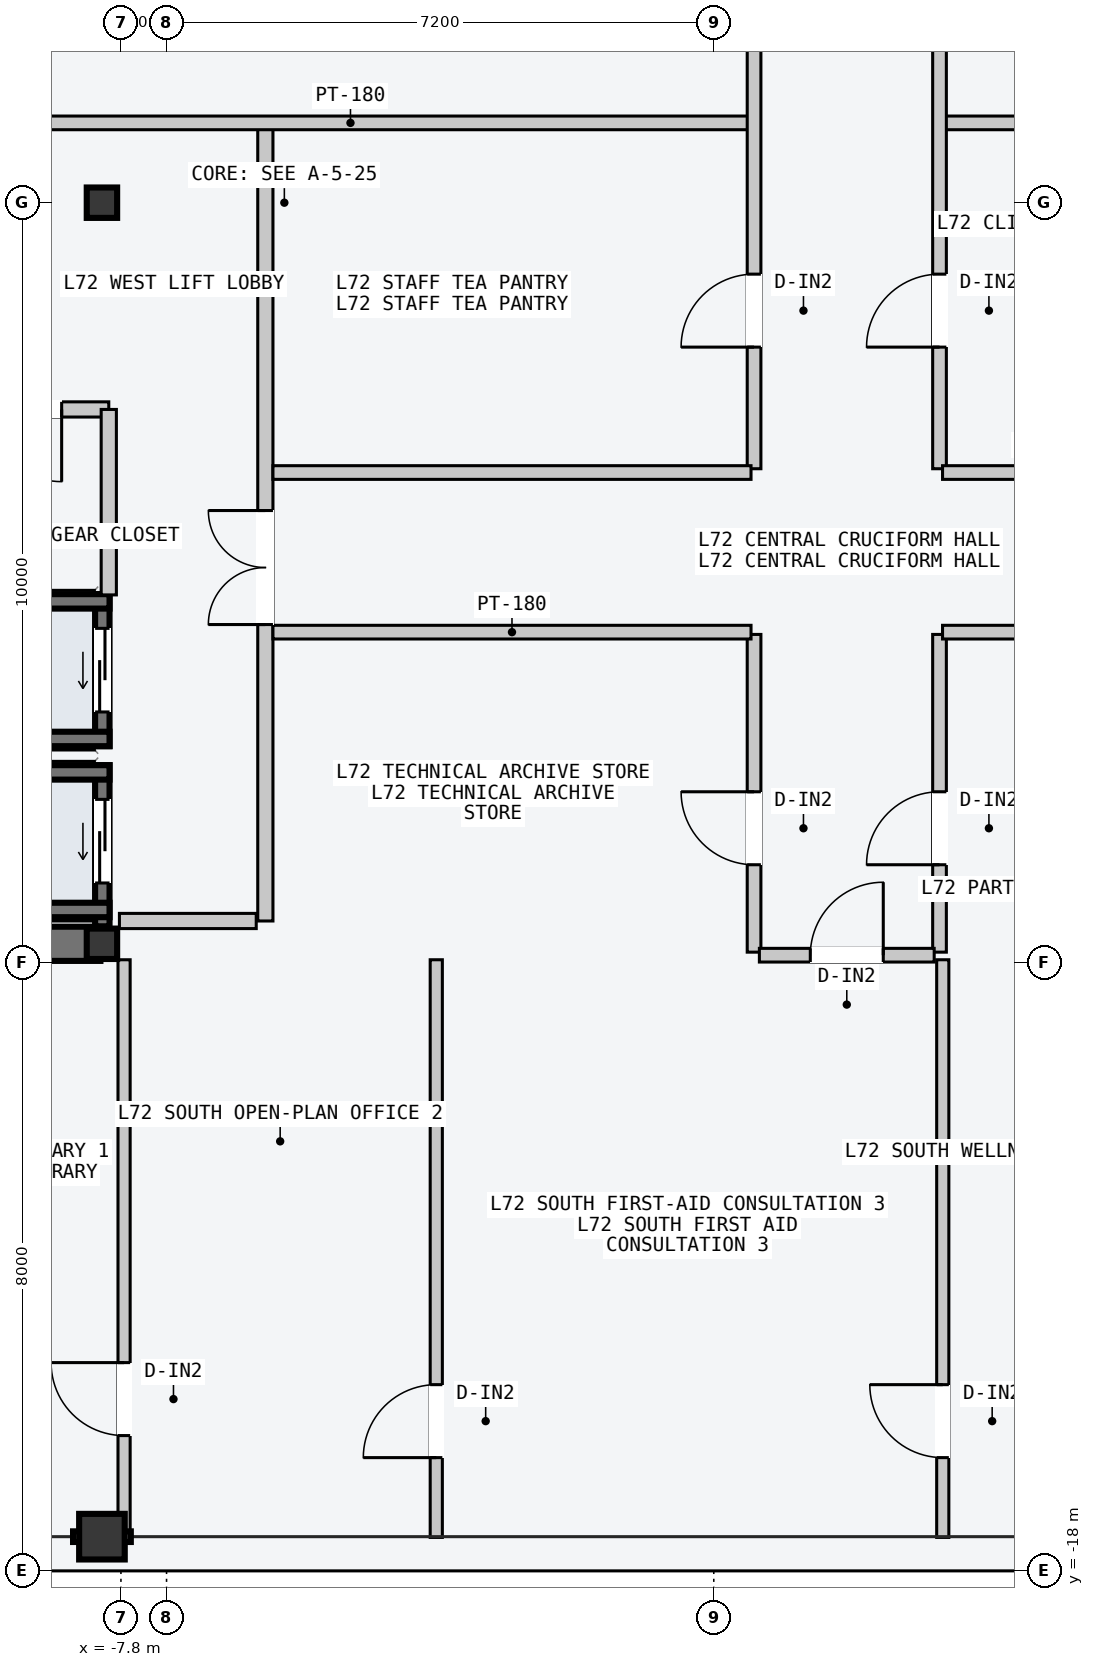
"""IFC4 building model, lengths in metres.
Left out: names, types, materials, properties, quantities, classifications, styles, units other than length and angle.
Written with IfcOpenShell. Run it as: python <this file> out.ifc"""

import sys

from ifc_helpers import new_model, si_unit, direction, frame, frame_2d, origin, origin_2d, place, context, subcontext, project, spatial, rectangle, hollow_rectangle, i_section, extrude, element, fill, save


model = new_model("IFC4")
c1 = context("Model", 3, precision=1e-05, world=origin(), true_north=direction((0.0, 1.0)))
c2 = subcontext(c1, "Body", "Model", "MODEL_VIEW")
j1 = project(units=[si_unit("LENGTHUNIT", "METRE"), si_unit("PLANEANGLEUNIT", "RADIAN")], contexts=[c1])
p1 = place(None, origin())
s1 = spatial("IfcSite", under=j1, at=p1, CompositionType="ELEMENT")
p2 = place(p1, origin())
s2 = spatial("IfcBuilding", under=s1, at=p2, CompositionType="ELEMENT")
p3 = place(p2, frame((0.0, 0.0, 272.4)))
s3 = spatial("IfcBuildingStorey", under=s2, at=p3, CompositionType="ELEMENT", Elevation=272.4)
p4 = place(p3, frame((-14.53, -9.75, -0.2), z_axis=(0.0, 0.0, 1.0), x_axis=(1.0, 0.0, 0.0)))
e1 = element("IfcWall", 1, at=p4, inside=s3, PredefinedType="SHEAR", context=c2, shape_type="SweptSolid", body=[
    extrude(rectangle(XDim=6.46, YDim=0.45, at=frame_2d((3.23, 0.0))), origin(), (0.0, 0.0, 1.0), 3.6),
])
for number, where, z_axis, x_axis in (
    (2, (-8.05, -9.75, 0.0), (0.0, 0.0, 1.0), (1.0, 0.0, 0.0)),
    (3, (-8.05, 0.0, 0.0), (0.0, 0.0, 1.0), (1.0, 0.0, 0.0)),
):
    element("IfcColumn", number, at=place(p3, frame(where, z_axis=z_axis, x_axis=x_axis)), inside=s3, PredefinedType="COLUMN", context=c2, shape_type="SweptSolid", body=[
        extrude(i_section(OverallWidth=0.4, OverallDepth=0.4, WebThickness=0.013, FlangeThickness=0.021, at=origin_2d()), origin(), (0.0, 0.0, 1.0), 3.6),
    ])
p5 = place(p3, frame((-8.05, -17.55, 0.0), z_axis=(0.0, 0.0, 1.0), x_axis=(1.0, 0.0, 0.0)))
e4 = element("IfcColumn", 4, at=p5, inside=s3, PredefinedType="COLUMN", context=c2, shape_type="SweptSolid", body=[
    extrude(hollow_rectangle(XDim=0.6, YDim=0.6, WallThickness=0.025, at=origin_2d()), origin(), (0.0, 0.0, 1.0), 3.6),
])
p6 = place(p3, frame((-8.045, -9.52, -0.2), z_axis=(0.0, 0.0, 1.0), x_axis=(0.0, 1.0, 0.0)))
e5 = element("IfcWall", 5, at=p6, inside=s3, PredefinedType="SOLIDWALL", context=c2, shape_type="SweptSolid", body=[
    extrude(rectangle(XDim=2.12, YDim=0.19, at=frame_2d((1.06, 0.0))), origin(), (0.0, 0.0, 1.0), 3.6),
])
p7 = place(p6, frame((0.57, 0.0, 0.2)))
e6 = element("IfcOpeningElement", 6, at=p7, cuts=e5, PredefinedType="OPENING", context=c2, shape_type="SweptSolid", body=[
    extrude(rectangle(XDim=1.1, YDim=2.2, at=frame_2d((0.55, 1.1))), frame((0.0, 0.105, 0.0), z_axis=(0.0, -1.0, 0.0), x_axis=(1.0, 0.0, 0.0)), (0.0, 0.0, 1.0), 0.21),
])
for number, where, z_axis, x_axis in (
    (7, (-10.15, -7.495, -0.2), (0.0, 0.0, 1.0), (1.0, 0.0, 0.0)),
    (8, (-10.15, -9.305, -0.2), (0.0, 0.0, 1.0), (1.0, 0.0, 0.0)),
):
    element("IfcWall", number, at=place(p3, frame(where, z_axis=z_axis, x_axis=x_axis)), inside=s3, PredefinedType="SOLIDWALL", context=c2, shape_type="SweptSolid", body=[
        extrude(rectangle(XDim=2.2, YDim=0.19, at=frame_2d((1.1, 0.0))), origin(), (0.0, 0.0, 1.0), 3.6),
    ])
p8 = place(p3, frame((-8.045, -7.15, -0.2), z_axis=(0.0, 0.0, 1.0), x_axis=(0.0, 1.0, 0.0)))
e9 = element("IfcWall", 9, at=p8, inside=s3, PredefinedType="SOLIDWALL", context=c2, shape_type="SweptSolid", body=[
    extrude(rectangle(XDim=2.0, YDim=0.19, at=frame_2d((1.0, 0.0))), origin(), (0.0, 0.0, 1.0), 3.6),
])
p9 = place(p8, frame((0.45, 0.0, 0.2)))
e10 = element("IfcOpeningElement", 10, at=p9, cuts=e9, PredefinedType="OPENING", context=c2, shape_type="SweptSolid", body=[
    extrude(rectangle(XDim=1.1, YDim=2.2, at=frame_2d((0.55, 1.1))), frame((0.0, 0.105, 0.0), z_axis=(0.0, -1.0, 0.0), x_axis=(1.0, 0.0, 0.0)), (0.0, 0.0, 1.0), 0.21),
])
for number, where, z_axis, x_axis in (
    (11, (-10.15, -5.245, -0.2), (0.0, 0.0, 1.0), (1.0, 0.0, 0.0)),
    (12, (-10.15, -7.055, -0.2), (0.0, 0.0, 1.0), (1.0, 0.0, 0.0)),
):
    element("IfcWall", number, at=place(p3, frame(where, z_axis=z_axis, x_axis=x_axis)), inside=s3, PredefinedType="SOLIDWALL", context=c2, shape_type="SweptSolid", body=[
        extrude(rectangle(XDim=2.2, YDim=0.19, at=frame_2d((1.1, 0.0))), origin(), (0.0, 0.0, 1.0), 3.6),
    ])
p10 = place(p3, frame((-5.9, -9.45, 0.0), z_axis=(0.0, 0.0, 1.0), x_axis=(0.0, 1.0, 0.0)))
e13 = element("IfcWall", 13, at=p10, inside=s3, PredefinedType="PARTITIONING", context=c2, shape_type="SweptSolid", body=[
    extrude(rectangle(XDim=10.5, YDim=0.2, at=frame_2d((5.25, 0.0))), origin(), (0.0, 0.0, 1.0), 3.4),
])
p11 = place(p10, frame((3.9, 0.0, 0.0)))
e14 = element("IfcOpeningElement", 14, at=p11, cuts=e13, PredefinedType="OPENING", context=c2, shape_type="SweptSolid", body=[
    extrude(rectangle(XDim=1.5, YDim=2.2, at=frame_2d((0.75, 1.1))), frame((0.0, 0.11, 0.0), z_axis=(0.0, -1.0, 0.0), x_axis=(1.0, 0.0, 0.0)), (0.0, 0.0, 1.0), 0.22),
])
p12 = place(p3, frame((-6.02, -9.45, 0.0), z_axis=(0.0, 0.0, 1.0), x_axis=(-1.0, 0.0, 0.0)))
e15 = element("IfcWall", 15, at=p12, inside=s3, PredefinedType="PARTITIONING", context=c2, shape_type="SweptSolid", body=[
    extrude(rectangle(XDim=1.8, YDim=0.2, at=frame_2d((0.9, 0.0))), origin(), (0.0, 0.0, 1.0), 3.4),
])
p13 = place(p3, frame((-7.96, -2.72, 0.0), z_axis=(0.0, 0.0, 1.0), x_axis=(-1.0, 0.0, 0.0)))
e16 = element("IfcWall", 16, at=p13, inside=s3, PredefinedType="PARTITIONING", context=c2, shape_type="SweptSolid", body=[
    extrude(rectangle(XDim=2.2, YDim=0.2, at=frame_2d((1.1, 0.0))), origin(), (0.0, 0.0, 1.0), 3.4),
])
p14 = place(p13, frame((0.62, 0.0, 0.0)))
e17 = element("IfcOpeningElement", 17, at=p14, cuts=e16, PredefinedType="OPENING", context=c2, shape_type="SweptSolid", body=[
    extrude(rectangle(XDim=0.95, YDim=2.1, at=frame_2d((0.475, 1.05))), frame((0.0, 0.11, 0.0), z_axis=(0.0, -1.0, 0.0), x_axis=(1.0, 0.0, 0.0)), (0.0, 0.0, 1.0), 0.22),
])
p15 = place(p3, frame((-7.96, -5.16, 0.0), z_axis=(0.0, 0.0, 1.0), x_axis=(0.0, 1.0, 0.0)))
e18 = element("IfcWall", 18, at=p15, inside=s3, PredefinedType="PARTITIONING", context=c2, shape_type="SweptSolid", body=[
    extrude(rectangle(XDim=2.44, YDim=0.2, at=frame_2d((1.22, 0.0))), origin(), (0.0, 0.0, 1.0), 3.4),
])
p16 = place(p3, frame((-10.05, 1.05, 0.0), z_axis=(0.0, 0.0, 1.0), x_axis=(1.0, 0.0, 0.0)))
e19 = element("IfcWall", 19, at=p16, inside=s3, PredefinedType="PARTITIONING", context=c2, shape_type="SweptSolid", body=[
    extrude(rectangle(XDim=10.54, YDim=0.18, at=frame_2d((5.27, 0.0))), origin(), (0.0, 0.0, 1.0), 3.4),
])
p17 = place(p3, frame((0.53, -3.5, 0.0), z_axis=(0.0, 0.0, 1.0), x_axis=(0.0, 1.0, 0.0)))
e20 = element("IfcWall", 20, at=p17, inside=s3, PredefinedType="PARTITIONING", context=c2, shape_type="SweptSolid", body=[
    extrude(rectangle(XDim=13.67, YDim=0.18, at=frame_2d((6.835, 0.0))), origin(), (0.0, 0.0, 1.0), 3.4),
])
p18 = place(p17, frame((6.1, 0.0, 0.0)))
e21 = element("IfcOpeningElement", 21, at=p18, cuts=e20, PredefinedType="OPENING", context=c2, shape_type="SweptSolid", body=[
    extrude(rectangle(XDim=1.24, YDim=2.24, at=frame_2d((0.62, 1.12))), frame((0.0, 0.1, 0.0), z_axis=(0.0, -1.0, 0.0), x_axis=(1.0, 0.0, 0.0)), (0.0, 0.0, 1.0), 0.2),
])
p19 = place(p17, frame((1.6, 0.0, 0.0)))
e22 = element("IfcOpeningElement", 22, at=p19, cuts=e20, PredefinedType="OPENING", context=c2, shape_type="SweptSolid", body=[
    extrude(rectangle(XDim=0.96, YDim=2.18, at=frame_2d((0.48, 1.09))), frame((0.0, 0.1, 0.0), z_axis=(0.0, -1.0, 0.0), x_axis=(1.0, 0.0, 0.0)), (0.0, 0.0, 1.0), 0.2),
])
p20 = place(p3, frame((-5.8, -3.55, 0.0), z_axis=(0.0, 0.0, 1.0), x_axis=(1.0, 0.0, 0.0)))
e23 = element("IfcWall", 23, at=p20, inside=s3, PredefinedType="PARTITIONING", context=c2, shape_type="SweptSolid", body=[
    extrude(rectangle(XDim=6.29, YDim=0.18, at=frame_2d((3.145, 0.0))), origin(), (0.0, 0.0, 1.0), 3.4),
])
p21 = place(p3, frame((3.01, 1.05, 0.0), z_axis=(0.0, 0.0, 1.0), x_axis=(1.0, 0.0, 0.0)))
e24 = element("IfcWall", 24, at=p21, inside=s3, PredefinedType="PARTITIONING", context=c2, shape_type="SweptSolid", body=[
    extrude(rectangle(XDim=7.05, YDim=0.18, at=frame_2d((3.525, 0.0))), origin(), (0.0, 0.0, 1.0), 3.4),
])
p22 = place(p3, frame((2.97, -3.5, 0.0), z_axis=(0.0, 0.0, 1.0), x_axis=(0.0, 1.0, 0.0)))
e25 = element("IfcWall", 25, at=p22, inside=s3, PredefinedType="PARTITIONING", context=c2, shape_type="SweptSolid", body=[
    extrude(rectangle(XDim=13.67, YDim=0.18, at=frame_2d((6.835, 0.0))), origin(), (0.0, 0.0, 1.0), 3.4),
])
p23 = place(p22, frame((6.1, 0.0, 0.0)))
e26 = element("IfcOpeningElement", 26, at=p23, cuts=e25, PredefinedType="OPENING", context=c2, shape_type="SweptSolid", body=[
    extrude(rectangle(XDim=1.24, YDim=2.24, at=frame_2d((0.62, 1.12))), frame((0.0, 0.1, 0.0), z_axis=(0.0, -1.0, 0.0), x_axis=(1.0, 0.0, 0.0)), (0.0, 0.0, 1.0), 0.2),
])
p24 = place(p22, frame((1.6, 0.0, 0.0)))
e27 = element("IfcOpeningElement", 27, at=p24, cuts=e25, PredefinedType="OPENING", context=c2, shape_type="SweptSolid", body=[
    extrude(rectangle(XDim=0.96, YDim=2.18, at=frame_2d((0.48, 1.09))), frame((0.0, 0.1, 0.0), z_axis=(0.0, -1.0, 0.0), x_axis=(1.0, 0.0, 0.0)), (0.0, 0.0, 1.0), 0.2),
])
p25 = place(p3, frame((3.01, -3.55, 0.0), z_axis=(0.0, 0.0, 1.0), x_axis=(1.0, 0.0, 0.0)))
e28 = element("IfcWall", 28, at=p25, inside=s3, PredefinedType="PARTITIONING", context=c2, shape_type="SweptSolid", body=[
    extrude(rectangle(XDim=2.79, YDim=0.18, at=frame_2d((1.395, 0.0))), origin(), (0.0, 0.0, 1.0), 3.4),
])
p26 = place(p3, frame((0.53, -9.86, 0.0), z_axis=(0.0, 0.0, 1.0), x_axis=(0.0, 1.0, 0.0)))
e29 = element("IfcWall", 29, at=p26, inside=s3, PredefinedType="PARTITIONING", context=c2, shape_type="SweptSolid", body=[
    extrude(rectangle(XDim=4.18, YDim=0.18, at=frame_2d((2.09, 0.0))), origin(), (0.0, 0.0, 1.0), 3.4),
])
p27 = place(p26, frame((1.15, 0.0, 0.0)))
e30 = element("IfcOpeningElement", 30, at=p27, cuts=e29, PredefinedType="OPENING", context=c2, shape_type="SweptSolid", body=[
    extrude(rectangle(XDim=0.96, YDim=2.18, at=frame_2d((0.48, 1.09))), frame((0.0, 0.1, 0.0), z_axis=(0.0, -1.0, 0.0), x_axis=(1.0, 0.0, 0.0)), (0.0, 0.0, 1.0), 0.2),
])
p28 = place(p3, frame((2.97, -9.86, 0.0), z_axis=(0.0, 0.0, 1.0), x_axis=(0.0, 1.0, 0.0)))
e31 = element("IfcWall", 31, at=p28, inside=s3, PredefinedType="PARTITIONING", context=c2, shape_type="SweptSolid", body=[
    extrude(rectangle(XDim=4.18, YDim=0.18, at=frame_2d((2.09, 0.0))), origin(), (0.0, 0.0, 1.0), 3.4),
])
p29 = place(p28, frame((1.15, 0.0, 0.0)))
e32 = element("IfcOpeningElement", 32, at=p29, cuts=e31, PredefinedType="OPENING", context=c2, shape_type="SweptSolid", body=[
    extrude(rectangle(XDim=0.96, YDim=2.18, at=frame_2d((0.48, 1.09))), frame((0.0, 0.1, 0.0), z_axis=(0.0, -1.0, 0.0), x_axis=(1.0, 0.0, 0.0)), (0.0, 0.0, 1.0), 0.2),
])
p30 = place(p3, frame((-5.8, -5.65, 0.0), z_axis=(0.0, 0.0, 1.0), x_axis=(1.0, 0.0, 0.0)))
e33 = element("IfcWall", 33, at=p30, inside=s3, PredefinedType="PARTITIONING", context=c2, shape_type="SweptSolid", body=[
    extrude(rectangle(XDim=6.29, YDim=0.18, at=frame_2d((3.145, 0.0))), origin(), (0.0, 0.0, 1.0), 3.4),
])
p31 = place(p3, frame((3.01, -5.65, 0.0), z_axis=(0.0, 0.0, 1.0), x_axis=(1.0, 0.0, 0.0)))
e34 = element("IfcWall", 34, at=p31, inside=s3, PredefinedType="PARTITIONING", context=c2, shape_type="SweptSolid", body=[
    extrude(rectangle(XDim=2.79, YDim=0.18, at=frame_2d((1.395, 0.0))), origin(), (0.0, 0.0, 1.0), 3.4),
])
p32 = place(p3, frame((-7.759, -17.56, 0.0), z_axis=(0.0, 0.0, 1.0), x_axis=(0.0, 1.0, 0.0)))
e35 = element("IfcWall", 35, at=p32, inside=s3, PredefinedType="PARTITIONING", context=c2, shape_type="SweptSolid", body=[
    extrude(rectangle(XDim=7.6, YDim=0.16, at=frame_2d((3.8, 0.0))), origin(), (0.0, 0.0, 1.0), 3.4),
])
p33 = place(p32, frame((1.34, 0.0, 0.0)))
e36 = element("IfcOpeningElement", 36, at=p33, cuts=e35, PredefinedType="OPENING", context=c2, shape_type="SweptSolid", body=[
    extrude(rectangle(XDim=0.96, YDim=2.18, at=frame_2d((0.48, 1.09))), frame((0.0, 0.09, 0.0), z_axis=(0.0, -1.0, 0.0), x_axis=(1.0, 0.0, 0.0)), (0.0, 0.0, 1.0), 0.18),
])
p34 = place(p3, frame((-3.651, -17.56, 0.0), z_axis=(0.0, 0.0, 1.0), x_axis=(0.0, 1.0, 0.0)))
e37 = element("IfcWall", 37, at=p34, inside=s3, PredefinedType="PARTITIONING", context=c2, shape_type="SweptSolid", body=[
    extrude(rectangle(XDim=7.6, YDim=0.16, at=frame_2d((3.8, 0.0))), origin(), (0.0, 0.0, 1.0), 3.4),
])
p35 = place(p34, frame((1.05, 0.0, 0.0)))
e38 = element("IfcOpeningElement", 38, at=p35, cuts=e37, PredefinedType="OPENING", context=c2, shape_type="SweptSolid", body=[
    extrude(rectangle(XDim=0.96, YDim=2.18, at=frame_2d((0.48, 1.09))), frame((0.0, 0.09, 0.0), z_axis=(0.0, -1.0, 0.0), x_axis=(1.0, 0.0, 0.0)), (0.0, 0.0, 1.0), 0.18),
])
p36 = place(p3, frame((3.013, -17.56, 0.0), z_axis=(0.0, 0.0, 1.0), x_axis=(0.0, 1.0, 0.0)))
e39 = element("IfcWall", 39, at=p36, inside=s3, PredefinedType="PARTITIONING", context=c2, shape_type="SweptSolid", body=[
    extrude(rectangle(XDim=7.6, YDim=0.16, at=frame_2d((3.8, 0.0))), origin(), (0.0, 0.0, 1.0), 3.4),
])
p37 = place(p36, frame((1.05, 0.0, 0.0)))
e40 = element("IfcOpeningElement", 40, at=p37, cuts=e39, PredefinedType="OPENING", context=c2, shape_type="SweptSolid", body=[
    extrude(rectangle(XDim=0.96, YDim=2.18, at=frame_2d((0.48, 1.09))), frame((0.0, 0.09, 0.0), z_axis=(0.0, -1.0, 0.0), x_axis=(1.0, 0.0, 0.0)), (0.0, 0.0, 1.0), 0.18),
])
p38 = place(p3, frame((0.6, -9.9, 0.0), z_axis=(0.0, 0.0, 1.0), x_axis=(1.0, 0.0, 0.0)))
e41 = element("IfcWall", 41, at=p38, inside=s3, PredefinedType="PARTITIONING", context=c2, shape_type="SweptSolid", body=[
    extrude(rectangle(XDim=2.3, YDim=0.18, at=frame_2d((1.15, 0.0))), origin(), (0.0, 0.0, 1.0), 3.4),
])
p39 = place(p38, frame((0.67, 0.0, 0.0)))
e42 = element("IfcOpeningElement", 42, at=p39, cuts=e41, PredefinedType="OPENING", context=c2, shape_type="SweptSolid", body=[
    extrude(rectangle(XDim=0.96, YDim=2.18, at=frame_2d((0.48, 1.09))), frame((0.0, 0.1, 0.0), z_axis=(0.0, -1.0, 0.0), x_axis=(1.0, 0.0, 0.0)), (0.0, 0.0, 1.0), 0.2),
])
p40 = place(p7, origin())
e43 = element("IfcDoor", 43, at=p40, inside=s3, OperationType="SLIDING_TO_LEFT", PredefinedType="DOOR", context=c2, shape_type="SweptSolid", body=[
    extrude(rectangle(XDim=1.1, YDim=2.2, at=frame_2d((0.55, 1.1))), frame((0.0, 0.025, 0.0), z_axis=(0.0, -1.0, 0.0), x_axis=(1.0, 0.0, 0.0)), (0.0, 0.0, 1.0), 0.05),
])
fill(e6, e43)
p41 = place(p9, origin())
e44 = element("IfcDoor", 44, at=p41, inside=s3, OperationType="SLIDING_TO_LEFT", PredefinedType="DOOR", context=c2, shape_type="SweptSolid", body=[
    extrude(rectangle(XDim=1.1, YDim=2.2, at=frame_2d((0.55, 1.1))), frame((0.0, 0.025, 0.0), z_axis=(0.0, -1.0, 0.0), x_axis=(1.0, 0.0, 0.0)), (0.0, 0.0, 1.0), 0.05),
])
fill(e10, e44)
p42 = place(p11, origin())
e45 = element("IfcDoor", 45, at=p42, inside=s3, OperationType="DOUBLE_DOOR_SINGLE_SWING", PredefinedType="DOOR", context=c2, shape_type="SweptSolid", body=[
    extrude(rectangle(XDim=1.5, YDim=2.2, at=frame_2d((0.75, 1.1))), frame((0.0, 0.025, 0.0), z_axis=(0.0, -1.0, 0.0), x_axis=(1.0, 0.0, 0.0)), (0.0, 0.0, 1.0), 0.05),
])
fill(e14, e45)
p43 = place(p14, origin())
e46 = element("IfcDoor", 46, at=p43, inside=s3, OperationType="SINGLE_SWING_LEFT", PredefinedType="DOOR", context=c2, shape_type="SweptSolid", body=[
    extrude(rectangle(XDim=0.95, YDim=2.1, at=frame_2d((0.475, 1.05))), frame((0.0, 0.025, 0.0), z_axis=(0.0, -1.0, 0.0), x_axis=(1.0, 0.0, 0.0)), (0.0, 0.0, 1.0), 0.05),
])
fill(e17, e46)
p44 = place(p19, origin())
e47 = element("IfcDoor", 47, at=p44, inside=s3, OperationType="SINGLE_SWING_LEFT", PredefinedType="DOOR", context=c2, shape_type="SweptSolid", body=[
    extrude(rectangle(XDim=0.96, YDim=2.18, at=frame_2d((0.48, 1.09))), frame((0.0, 0.025, 0.0), z_axis=(0.0, -1.0, 0.0), x_axis=(1.0, 0.0, 0.0)), (0.0, 0.0, 1.0), 0.05),
])
fill(e22, e47)
p45 = place(p24, origin())
e48 = element("IfcDoor", 48, at=p45, inside=s3, OperationType="SINGLE_SWING_LEFT", PredefinedType="DOOR", context=c2, shape_type="SweptSolid", body=[
    extrude(rectangle(XDim=0.96, YDim=2.18, at=frame_2d((0.48, 1.09))), frame((0.0, 0.025, 0.0), z_axis=(0.0, -1.0, 0.0), x_axis=(1.0, 0.0, 0.0)), (0.0, 0.0, 1.0), 0.05),
])
fill(e27, e48)
p46 = place(p27, origin())
e49 = element("IfcDoor", 49, at=p46, inside=s3, OperationType="SINGLE_SWING_RIGHT", PredefinedType="DOOR", context=c2, shape_type="SweptSolid", body=[
    extrude(rectangle(XDim=0.96, YDim=2.18, at=frame_2d((0.48, 1.09))), frame((0.0, 0.025, 0.0), z_axis=(0.0, -1.0, 0.0), x_axis=(1.0, 0.0, 0.0)), (0.0, 0.0, 1.0), 0.05),
])
fill(e30, e49)
p47 = place(p29, origin())
e50 = element("IfcDoor", 50, at=p47, inside=s3, OperationType="SINGLE_SWING_LEFT", PredefinedType="DOOR", context=c2, shape_type="SweptSolid", body=[
    extrude(rectangle(XDim=0.96, YDim=2.18, at=frame_2d((0.48, 1.09))), frame((0.0, 0.025, 0.0), z_axis=(0.0, -1.0, 0.0), x_axis=(1.0, 0.0, 0.0)), (0.0, 0.0, 1.0), 0.05),
])
fill(e32, e50)
p48 = place(p33, origin())
e51 = element("IfcDoor", 51, at=p48, inside=s3, OperationType="SINGLE_SWING_RIGHT", PredefinedType="DOOR", context=c2, shape_type="SweptSolid", body=[
    extrude(rectangle(XDim=0.96, YDim=2.18, at=frame_2d((0.48, 1.09))), frame((0.0, 0.025, 0.0), z_axis=(0.0, -1.0, 0.0), x_axis=(1.0, 0.0, 0.0)), (0.0, 0.0, 1.0), 0.05),
])
fill(e36, e51)
p49 = place(p35, origin())
e52 = element("IfcDoor", 52, at=p49, inside=s3, OperationType="SINGLE_SWING_LEFT", PredefinedType="DOOR", context=c2, shape_type="SweptSolid", body=[
    extrude(rectangle(XDim=0.96, YDim=2.18, at=frame_2d((0.48, 1.09))), frame((0.0, 0.025, 0.0), z_axis=(0.0, -1.0, 0.0), x_axis=(1.0, 0.0, 0.0)), (0.0, 0.0, 1.0), 0.05),
])
fill(e38, e52)
p50 = place(p37, origin())
e53 = element("IfcDoor", 53, at=p50, inside=s3, OperationType="SINGLE_SWING_RIGHT", PredefinedType="DOOR", context=c2, shape_type="SweptSolid", body=[
    extrude(rectangle(XDim=0.96, YDim=2.18, at=frame_2d((0.48, 1.09))), frame((0.0, 0.025, 0.0), z_axis=(0.0, -1.0, 0.0), x_axis=(1.0, 0.0, 0.0)), (0.0, 0.0, 1.0), 0.05),
])
fill(e40, e53)
p51 = place(p39, origin())
e54 = element("IfcDoor", 54, at=p51, inside=s3, OperationType="SINGLE_SWING_RIGHT", PredefinedType="DOOR", context=c2, shape_type="SweptSolid", body=[
    extrude(rectangle(XDim=0.96, YDim=2.18, at=frame_2d((0.48, 1.09))), frame((0.0, 0.025, 0.0), z_axis=(0.0, -1.0, 0.0), x_axis=(1.0, 0.0, 0.0)), (0.0, 0.0, 1.0), 0.05),
])
fill(e42, e54)
save(model, sys.argv[1])
